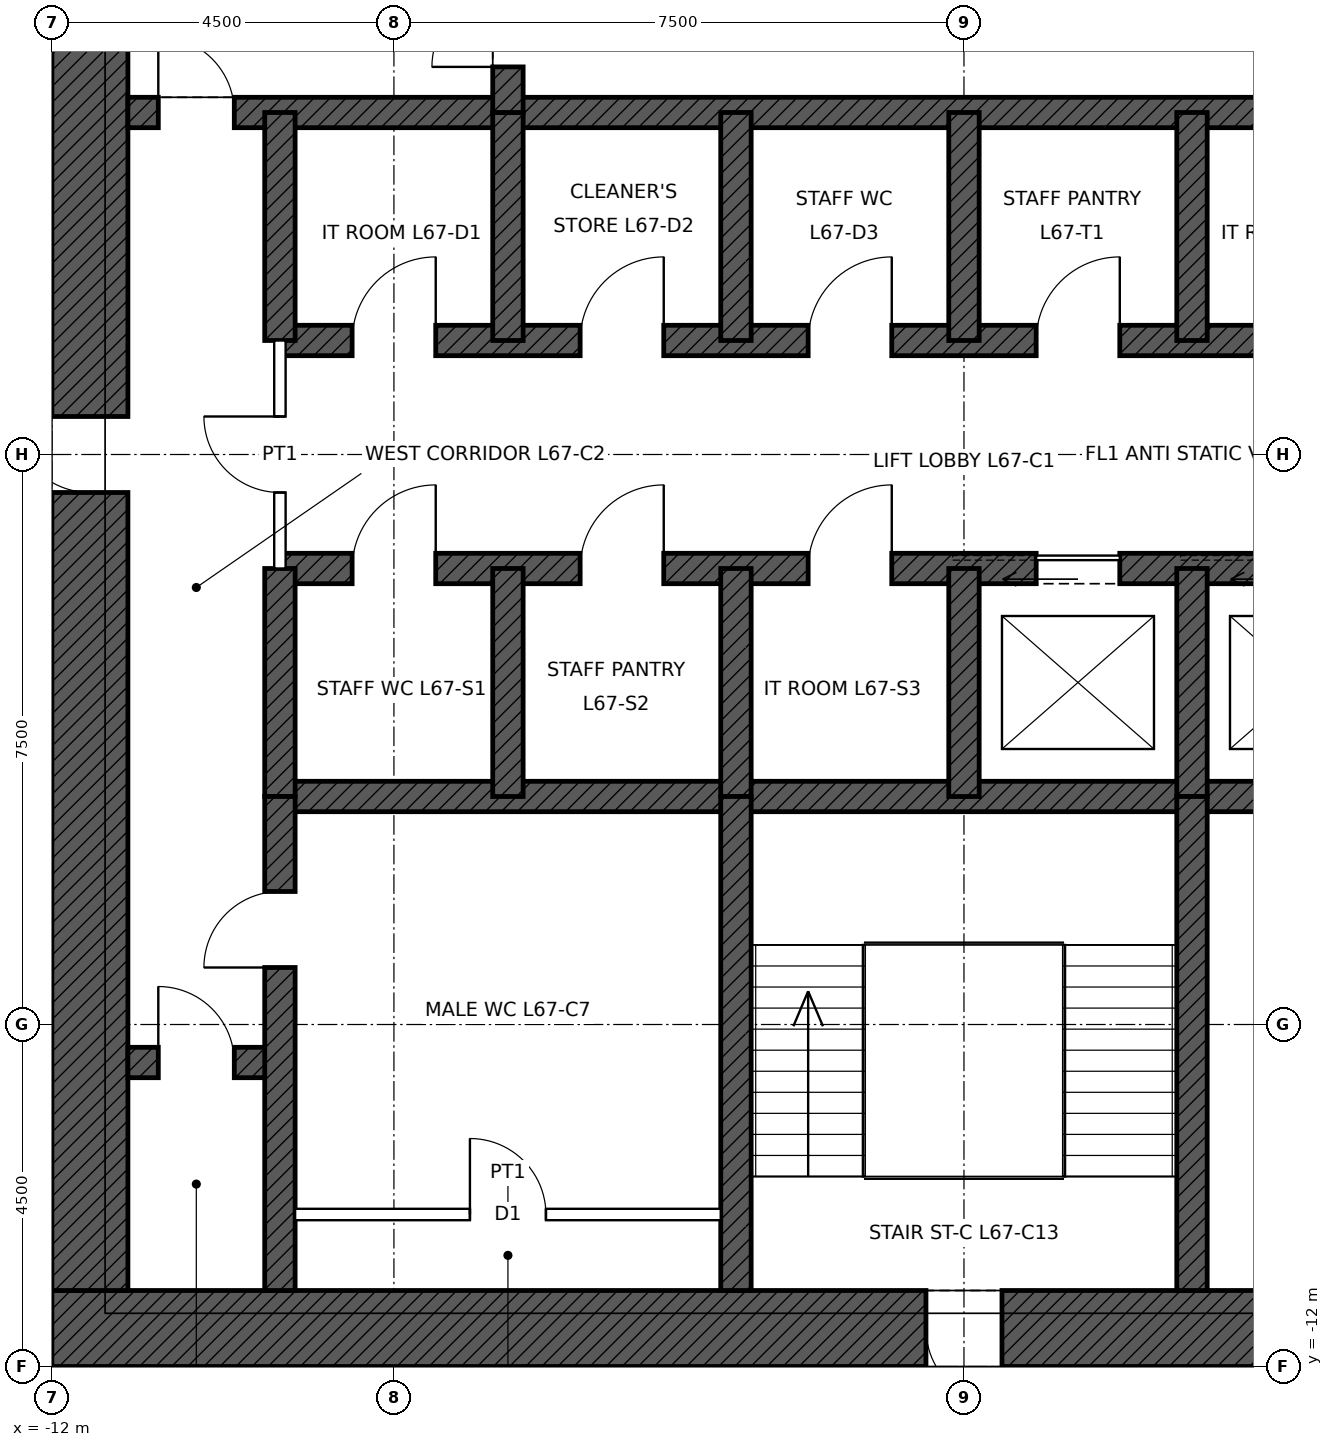
"""IFC4 building model, lengths in metres.
Left out: names, types, materials, properties, quantities, classifications, styles, units other than length and angle.
Written with IfcOpenShell. Run it as: python <this file> out.ifc"""

import sys

from ifc_helpers import new_model, si_unit, direction, frame, frame_2d, origin, place, context, subcontext, project, spatial, rectangle, extrude, element, fill, save


model = new_model("IFC4")
c1 = context("Model", 3, precision=1e-05, world=origin(), true_north=direction((0.0, 1.0)))
c2 = subcontext(c1, "Body", "Model", "MODEL_VIEW")
j1 = project(units=[si_unit("LENGTHUNIT", "METRE"), si_unit("PLANEANGLEUNIT", "RADIAN")], contexts=[c1])
p1 = place(None, origin())
s1 = spatial("IfcSite", under=j1, at=p1, CompositionType="ELEMENT")
p2 = place(p1, origin())
s2 = spatial("IfcBuilding", under=s1, at=p2, CompositionType="ELEMENT")
p3 = place(p2, frame((0.0, 0.0, 303.9)))
s3 = spatial("IfcBuildingStorey", under=s2, at=p3, CompositionType="ELEMENT", Elevation=303.9)
p4 = place(p3, frame((12.0, -11.5, 0.0), z_axis=(0.0, 0.0, 1.0), x_axis=(-1.0, 0.0, 0.0)))
e1 = element("IfcWall", 1, at=p4, inside=s3, PredefinedType="SHEAR", context=c2, shape_type="SweptSolid", body=[
    extrude(rectangle(XDim=24.0, YDim=1.0, at=frame_2d((12.0, 0.0))), origin(), (0.0, 0.0, 1.0), 4.0),
])
p5 = place(p4, frame((11.5, 0.0, 0.0)))
e2 = element("IfcOpeningElement", 2, at=p5, cuts=e1, PredefinedType="OPENING", context=c2, shape_type="SweptSolid", body=[
    extrude(rectangle(XDim=1.0, YDim=2.1, at=frame_2d((0.5, 1.05))), frame((0.0, 0.51, 0.0), z_axis=(0.0, -1.0, 0.0), x_axis=(1.0, 0.0, 0.0)), (0.0, 0.0, 1.0), 1.02),
])
p6 = place(p4, frame((1.0, 0.0, 0.0)))
e3 = element("IfcOpeningElement", 3, at=p6, cuts=e1, PredefinedType="OPENING", context=c2, shape_type="SweptSolid", body=[
    extrude(rectangle(XDim=1.0, YDim=2.4, at=frame_2d((0.5, 1.2))), frame((0.0, 0.51, 0.0), z_axis=(0.0, -1.0, 0.0), x_axis=(1.0, 0.0, 0.0)), (0.0, 0.0, 1.0), 1.02),
])
p7 = place(p3, frame((-11.5, -11.0, 0.0), z_axis=(0.0, 0.0, 1.0), x_axis=(0.0, 1.0, 0.0)))
e4 = element("IfcWall", 4, at=p7, inside=s3, PredefinedType="SHEAR", context=c2, shape_type="SweptSolid", body=[
    extrude(rectangle(XDim=22.0, YDim=1.0, at=frame_2d((11.0, 0.0))), origin(), (0.0, 0.0, 1.0), 4.0),
])
p8 = place(p7, frame((10.5, 0.0, 0.0)))
e5 = element("IfcOpeningElement", 5, at=p8, cuts=e4, PredefinedType="OPENING", context=c2, shape_type="SweptSolid", body=[
    extrude(rectangle(XDim=1.0, YDim=2.4, at=frame_2d((0.5, 1.2))), frame((0.0, 0.51, 0.0), z_axis=(0.0, -1.0, 0.0), x_axis=(1.0, 0.0, 0.0)), (0.0, 0.0, 1.0), 1.02),
])
p9 = place(p3, frame((-11.0, 4.5, 0.0), z_axis=(0.0, 0.0, 1.0), x_axis=(1.0, 0.0, 0.0)))
e6 = element("IfcWall", 6, at=p9, inside=s3, PredefinedType="SHEAR", context=c2, shape_type="SweptSolid", body=[
    extrude(rectangle(XDim=22.0, YDim=0.4, at=frame_2d((11.0, 0.0))), origin(), (0.0, 0.0, 1.0), 4.0),
])
p10 = place(p9, frame((0.4, 0.0, 0.0)))
e7 = element("IfcOpeningElement", 7, at=p10, cuts=e6, PredefinedType="OPENING", context=c2, shape_type="SweptSolid", body=[
    extrude(rectangle(XDim=1.0, YDim=2.1, at=frame_2d((0.5, 1.05))), frame((0.0, 0.21, 0.0), z_axis=(0.0, -1.0, 0.0), x_axis=(1.0, 0.0, 0.0)), (0.0, 0.0, 1.0), 0.42),
])
p11 = place(p9, frame((20.6, 0.0, 0.0)))
e8 = element("IfcOpeningElement", 8, at=p11, cuts=e6, PredefinedType="OPENING", context=c2, shape_type="SweptSolid", body=[
    extrude(rectangle(XDim=1.0, YDim=2.1, at=frame_2d((0.5, 1.05))), frame((0.0, 0.21, 0.0), z_axis=(0.0, -1.0, 0.0), x_axis=(1.0, 0.0, 0.0)), (0.0, 0.0, 1.0), 0.42),
])
p12 = place(p3, frame((-9.0, 1.5, 0.0), z_axis=(0.0, 0.0, 1.0), x_axis=(1.0, 0.0, 0.0)))
e9 = element("IfcWall", 9, at=p12, inside=s3, PredefinedType="SHEAR", context=c2, shape_type="SweptSolid", body=[
    extrude(rectangle(XDim=18.0, YDim=0.4, at=frame_2d((9.0, 0.0))), origin(), (0.0, 0.0, 1.0), 4.0),
])
p13 = place(p12, frame((0.95, 0.0, 0.0)))
e10 = element("IfcOpeningElement", 10, at=p13, cuts=e9, PredefinedType="OPENING", context=c2, shape_type="SweptSolid", body=[
    extrude(rectangle(XDim=1.1, YDim=2.1, at=frame_2d((0.55, 1.05))), frame((0.0, 0.21, 0.0), z_axis=(0.0, -1.0, 0.0), x_axis=(1.0, 0.0, 0.0)), (0.0, 0.0, 1.0), 0.42),
])
p14 = place(p12, frame((3.95, 0.0, 0.0)))
e11 = element("IfcOpeningElement", 11, at=p14, cuts=e9, PredefinedType="OPENING", context=c2, shape_type="SweptSolid", body=[
    extrude(rectangle(XDim=1.1, YDim=2.1, at=frame_2d((0.55, 1.05))), frame((0.0, 0.21, 0.0), z_axis=(0.0, -1.0, 0.0), x_axis=(1.0, 0.0, 0.0)), (0.0, 0.0, 1.0), 0.42),
])
p15 = place(p12, frame((6.95, 0.0, 0.0)))
e12 = element("IfcOpeningElement", 12, at=p15, cuts=e9, PredefinedType="OPENING", context=c2, shape_type="SweptSolid", body=[
    extrude(rectangle(XDim=1.1, YDim=2.1, at=frame_2d((0.55, 1.05))), frame((0.0, 0.21, 0.0), z_axis=(0.0, -1.0, 0.0), x_axis=(1.0, 0.0, 0.0)), (0.0, 0.0, 1.0), 0.42),
])
p16 = place(p12, frame((9.95, 0.0, 0.0)))
e13 = element("IfcOpeningElement", 13, at=p16, cuts=e9, PredefinedType="OPENING", context=c2, shape_type="SweptSolid", body=[
    extrude(rectangle(XDim=1.1, YDim=2.1, at=frame_2d((0.55, 1.05))), frame((0.0, 0.21, 0.0), z_axis=(0.0, -1.0, 0.0), x_axis=(1.0, 0.0, 0.0)), (0.0, 0.0, 1.0), 0.42),
])
p17 = place(p12, frame((12.95, 0.0, 0.0)))
e14 = element("IfcOpeningElement", 14, at=p17, cuts=e9, PredefinedType="OPENING", context=c2, shape_type="SweptSolid", body=[
    extrude(rectangle(XDim=1.1, YDim=2.1, at=frame_2d((0.55, 1.05))), frame((0.0, 0.21, 0.0), z_axis=(0.0, -1.0, 0.0), x_axis=(1.0, 0.0, 0.0)), (0.0, 0.0, 1.0), 0.42),
])
p18 = place(p12, frame((15.95, 0.0, 0.0)))
e15 = element("IfcOpeningElement", 15, at=p18, cuts=e9, PredefinedType="OPENING", context=c2, shape_type="SweptSolid", body=[
    extrude(rectangle(XDim=1.1, YDim=2.1, at=frame_2d((0.55, 1.05))), frame((0.0, 0.21, 0.0), z_axis=(0.0, -1.0, 0.0), x_axis=(1.0, 0.0, 0.0)), (0.0, 0.0, 1.0), 0.42),
])
p19 = place(p3, frame((-9.0, -1.5, 0.0), z_axis=(0.0, 0.0, 1.0), x_axis=(1.0, 0.0, 0.0)))
e16 = element("IfcWall", 16, at=p19, inside=s3, PredefinedType="SHEAR", context=c2, shape_type="SweptSolid", body=[
    extrude(rectangle(XDim=18.0, YDim=0.4, at=frame_2d((9.0, 0.0))), origin(), (0.0, 0.0, 1.0), 4.0),
])
p20 = place(p19, frame((9.95, 0.0, 0.0)))
e17 = element("IfcOpeningElement", 17, at=p20, cuts=e16, PredefinedType="OPENING", context=c2, shape_type="SweptSolid", body=[
    extrude(rectangle(XDim=1.1, YDim=2.1, at=frame_2d((0.55, 1.05))), frame((0.0, 0.21, 0.0), z_axis=(0.0, -1.0, 0.0), x_axis=(1.0, 0.0, 0.0)), (0.0, 0.0, 1.0), 0.42),
])
p21 = place(p19, frame((12.95, 0.0, 0.0)))
e18 = element("IfcOpeningElement", 18, at=p21, cuts=e16, PredefinedType="OPENING", context=c2, shape_type="SweptSolid", body=[
    extrude(rectangle(XDim=1.1, YDim=2.1, at=frame_2d((0.55, 1.05))), frame((0.0, 0.21, 0.0), z_axis=(0.0, -1.0, 0.0), x_axis=(1.0, 0.0, 0.0)), (0.0, 0.0, 1.0), 0.42),
])
p22 = place(p19, frame((15.95, 0.0, 0.0)))
e19 = element("IfcOpeningElement", 19, at=p22, cuts=e16, PredefinedType="OPENING", context=c2, shape_type="SweptSolid", body=[
    extrude(rectangle(XDim=1.1, YDim=2.1, at=frame_2d((0.55, 1.05))), frame((0.0, 0.21, 0.0), z_axis=(0.0, -1.0, 0.0), x_axis=(1.0, 0.0, 0.0)), (0.0, 0.0, 1.0), 0.42),
])
p23 = place(p19, frame((0.95, 0.0, 0.0)))
e20 = element("IfcOpeningElement", 20, at=p23, cuts=e16, PredefinedType="OPENING", context=c2, shape_type="SweptSolid", body=[
    extrude(rectangle(XDim=1.1, YDim=2.1, at=frame_2d((0.55, 1.05))), frame((0.0, 0.21, 0.0), z_axis=(0.0, -1.0, 0.0), x_axis=(1.0, 0.0, 0.0)), (0.0, 0.0, 1.0), 0.42),
])
p24 = place(p19, frame((3.95, 0.0, 0.0)))
e21 = element("IfcOpeningElement", 21, at=p24, cuts=e16, PredefinedType="OPENING", context=c2, shape_type="SweptSolid", body=[
    extrude(rectangle(XDim=1.1, YDim=2.1, at=frame_2d((0.55, 1.05))), frame((0.0, 0.21, 0.0), z_axis=(0.0, -1.0, 0.0), x_axis=(1.0, 0.0, 0.0)), (0.0, 0.0, 1.0), 0.42),
])
p25 = place(p19, frame((6.95, 0.0, 0.0)))
e22 = element("IfcOpeningElement", 22, at=p25, cuts=e16, PredefinedType="OPENING", context=c2, shape_type="SweptSolid", body=[
    extrude(rectangle(XDim=1.1, YDim=2.1, at=frame_2d((0.55, 1.05))), frame((0.0, 0.21, 0.0), z_axis=(0.0, -1.0, 0.0), x_axis=(1.0, 0.0, 0.0)), (0.0, 0.0, 1.0), 0.42),
])
p26 = place(p3, frame((-9.0, -4.5, 0.0), z_axis=(0.0, 0.0, 1.0), x_axis=(1.0, 0.0, 0.0)))
e23 = element("IfcWall", 23, at=p26, inside=s3, PredefinedType="SHEAR", context=c2, shape_type="SweptSolid", body=[
    extrude(rectangle(XDim=18.0, YDim=0.4, at=frame_2d((9.0, 0.0))), origin(), (0.0, 0.0, 1.0), 4.0),
])
p27 = place(p3, frame((-11.0, -8.0, 0.0), z_axis=(0.0, 0.0, 1.0), x_axis=(1.0, 0.0, 0.0)))
e24 = element("IfcWall", 24, at=p27, inside=s3, PredefinedType="SHEAR", context=c2, shape_type="SweptSolid", body=[
    extrude(rectangle(XDim=2.0, YDim=0.4, at=frame_2d((1.0, 0.0))), origin(), (0.0, 0.0, 1.0), 4.0),
])
p28 = place(p27, frame((0.4, 0.0, 0.0)))
e25 = element("IfcOpeningElement", 25, at=p28, cuts=e24, PredefinedType="OPENING", context=c2, shape_type="SweptSolid", body=[
    extrude(rectangle(XDim=1.0, YDim=2.1, at=frame_2d((0.5, 1.05))), frame((0.0, 0.21, 0.0), z_axis=(0.0, -1.0, 0.0), x_axis=(1.0, 0.0, 0.0)), (0.0, 0.0, 1.0), 0.42),
])
for number, where, z_axis, x_axis in (
    (26, (-9.0, 1.5, 0.0), (0.0, 0.0, 1.0), (0.0, 1.0, 0.0)),
    (27, (-9.0, -4.5, 0.0), (0.0, 0.0, 1.0), (0.0, 1.0, 0.0)),
    (28, (-6.0, 1.5, 0.0), (0.0, 0.0, 1.0), (0.0, 1.0, 0.0)),
    (29, (-3.0, 1.5, 0.0), (0.0, 0.0, 1.0), (0.0, 1.0, 0.0)),
    (30, (0.0, 1.5, 0.0), (0.0, 0.0, 1.0), (0.0, 1.0, 0.0)),
    (31, (3.0, 1.5, 0.0), (0.0, 0.0, 1.0), (0.0, 1.0, 0.0)),
    (32, (-6.0, -4.5, 0.0), (0.0, 0.0, 1.0), (0.0, 1.0, 0.0)),
    (33, (-3.0, -4.5, 0.0), (0.0, 0.0, 1.0), (0.0, 1.0, 0.0)),
    (34, (0.0, -4.5, 0.0), (0.0, 0.0, 1.0), (0.0, 1.0, 0.0)),
    (35, (3.0, -4.5, 0.0), (0.0, 0.0, 1.0), (0.0, 1.0, 0.0)),
):
    element("IfcWall", number, at=place(p3, frame(where, z_axis=z_axis, x_axis=x_axis)), inside=s3, PredefinedType="SHEAR", context=c2, shape_type="SweptSolid", body=[
        extrude(rectangle(XDim=3.0, YDim=0.4, at=frame_2d((1.5, 0.0))), origin(), (0.0, 0.0, 1.0), 4.0),
    ])
p29 = place(p3, frame((-6.0, 4.5, 0.0), z_axis=(0.0, 0.0, 1.0), x_axis=(0.0, 1.0, 0.0)))
e36 = element("IfcWall", 36, at=p29, inside=s3, PredefinedType="SHEAR", context=c2, shape_type="SweptSolid", body=[
    extrude(rectangle(XDim=6.5, YDim=0.4, at=frame_2d((3.25, 0.0))), origin(), (0.0, 0.0, 1.0), 4.0),
])
p30 = place(p29, frame((0.6, 0.0, 0.0)))
e37 = element("IfcOpeningElement", 37, at=p30, cuts=e36, PredefinedType="OPENING", context=c2, shape_type="SweptSolid", body=[
    extrude(rectangle(XDim=1.0, YDim=2.1, at=frame_2d((0.5, 1.05))), frame((0.0, 0.21, 0.0), z_axis=(0.0, -1.0, 0.0), x_axis=(1.0, 0.0, 0.0)), (0.0, 0.0, 1.0), 0.42),
])
p31 = place(p3, frame((-9.0, -11.0, 0.0), z_axis=(0.0, 0.0, 1.0), x_axis=(0.0, 1.0, 0.0)))
e38 = element("IfcWall", 38, at=p31, inside=s3, PredefinedType="SHEAR", context=c2, shape_type="SweptSolid", body=[
    extrude(rectangle(XDim=6.5, YDim=0.4, at=frame_2d((3.25, 0.0))), origin(), (0.0, 0.0, 1.0), 4.0),
])
p32 = place(p31, frame((4.25, 0.0, 0.0)))
e39 = element("IfcOpeningElement", 39, at=p32, cuts=e38, PredefinedType="OPENING", context=c2, shape_type="SweptSolid", body=[
    extrude(rectangle(XDim=1.0, YDim=2.1, at=frame_2d((0.5, 1.05))), frame((0.0, 0.21, 0.0), z_axis=(0.0, -1.0, 0.0), x_axis=(1.0, 0.0, 0.0)), (0.0, 0.0, 1.0), 0.42),
])
for number, where, z_axis, x_axis in (
    (40, (-3.0, -11.0, 0.0), (0.0, 0.0, 1.0), (0.0, 1.0, 0.0)),
    (41, (3.0, -11.0, 0.0), (0.0, 0.0, 1.0), (0.0, 1.0, 0.0)),
):
    element("IfcWall", number, at=place(p3, frame(where, z_axis=z_axis, x_axis=x_axis)), inside=s3, PredefinedType="SHEAR", context=c2, shape_type="SweptSolid", body=[
        extrude(rectangle(XDim=6.5, YDim=0.4, at=frame_2d((3.25, 0.0))), origin(), (0.0, 0.0, 1.0), 4.0),
    ])
p33 = place(p3, frame((-8.8, -10.0, 0.0), z_axis=(0.0, 0.0, 1.0), x_axis=(1.0, 0.0, 0.0)))
e42 = element("IfcWall", 42, at=p33, inside=s3, PredefinedType="PARTITIONING", context=c2, shape_type="SweptSolid", body=[
    extrude(rectangle(XDim=5.6, YDim=0.15, at=frame_2d((2.8, 0.0))), origin(), (0.0, 0.0, 1.0), 3.75),
])
p34 = place(p33, frame((2.3, 0.0, 0.0)))
e43 = element("IfcOpeningElement", 43, at=p34, cuts=e42, PredefinedType="OPENING", context=c2, shape_type="SweptSolid", body=[
    extrude(rectangle(XDim=1.0, YDim=2.1, at=frame_2d((0.5, 1.05))), frame((0.0, 0.085, 0.0), z_axis=(0.0, -1.0, 0.0), x_axis=(1.0, 0.0, 0.0)), (0.0, 0.0, 1.0), 0.17),
])
p35 = place(p3, frame((-9.0, -1.5, 0.0), z_axis=(0.0, 0.0, 1.0), x_axis=(0.0, 1.0, 0.0)))
e44 = element("IfcWall", 44, at=p35, inside=s3, PredefinedType="PARTITIONING", context=c2, shape_type="SweptSolid", body=[
    extrude(rectangle(XDim=3.0, YDim=0.15, at=frame_2d((1.5, 0.0))), origin(), (0.0, 0.0, 1.0), 3.75),
])
p36 = place(p35, frame((1.0, 0.0, 0.0)))
e45 = element("IfcOpeningElement", 45, at=p36, cuts=e44, PredefinedType="OPENING", context=c2, shape_type="SweptSolid", body=[
    extrude(rectangle(XDim=1.0, YDim=2.4, at=frame_2d((0.5, 1.2))), frame((0.0, 0.085, 0.0), z_axis=(0.0, -1.0, 0.0), x_axis=(1.0, 0.0, 0.0)), (0.0, 0.0, 1.0), 0.17),
])
p37 = place(p10, origin())
e46 = element("IfcDoor", 46, at=p37, inside=s3, OperationType="SINGLE_SWING_LEFT", PredefinedType="DOOR", context=c2, shape_type="SweptSolid", body=[
    extrude(rectangle(XDim=1.0, YDim=2.1, at=frame_2d((0.5, 1.05))), frame((0.0, 0.025, 0.0), z_axis=(0.0, -1.0, 0.0), x_axis=(1.0, 0.0, 0.0)), (0.0, 0.0, 1.0), 0.05),
])
fill(e7, e46)
p38 = place(p30, origin())
e47 = element("IfcDoor", 47, at=p38, inside=s3, OperationType="SINGLE_SWING_LEFT", PredefinedType="DOOR", context=c2, shape_type="SweptSolid", body=[
    extrude(rectangle(XDim=1.0, YDim=2.1, at=frame_2d((0.5, 1.05))), frame((0.0, 0.025, 0.0), z_axis=(0.0, -1.0, 0.0), x_axis=(1.0, 0.0, 0.0)), (0.0, 0.0, 1.0), 0.05),
])
fill(e37, e47)
p39 = place(p5, origin())
e48 = element("IfcDoor", 48, at=p39, inside=s3, OperationType="SINGLE_SWING_LEFT", PredefinedType="DOOR", context=c2, shape_type="SweptSolid", body=[
    extrude(rectangle(XDim=1.0, YDim=2.1, at=frame_2d((0.5, 1.05))), frame((0.0, 0.485, 0.0), z_axis=(0.0, -1.0, 0.0), x_axis=(1.0, 0.0, 0.0)), (0.0, 0.0, 1.0), 0.05),
])
fill(e2, e48)
p40 = place(p8, origin())
e49 = element("IfcDoor", 49, at=p40, inside=s3, OperationType="SINGLE_SWING_RIGHT", PredefinedType="DOOR", context=c2, shape_type="SweptSolid", body=[
    extrude(rectangle(XDim=1.0, YDim=2.4, at=frame_2d((0.5, 1.2))), frame((0.0, 0.485, 0.0), z_axis=(0.0, -1.0, 0.0), x_axis=(1.0, 0.0, 0.0)), (0.0, 0.0, 1.0), 0.05),
])
fill(e5, e49)
p41 = place(p32, origin())
e50 = element("IfcDoor", 50, at=p41, inside=s3, OperationType="SINGLE_SWING_LEFT", PredefinedType="DOOR", context=c2, shape_type="SweptSolid", body=[
    extrude(rectangle(XDim=1.0, YDim=2.1, at=frame_2d((0.5, 1.05))), frame((0.0, 0.025, 0.0), z_axis=(0.0, -1.0, 0.0), x_axis=(1.0, 0.0, 0.0)), (0.0, 0.0, 1.0), 0.05),
])
fill(e39, e50)
p42 = place(p28, origin())
e51 = element("IfcDoor", 51, at=p42, inside=s3, OperationType="SINGLE_SWING_LEFT", PredefinedType="DOOR", context=c2, shape_type="SweptSolid", body=[
    extrude(rectangle(XDim=1.0, YDim=2.1, at=frame_2d((0.5, 1.05))), frame((0.0, 0.025, 0.0), z_axis=(0.0, -1.0, 0.0), x_axis=(1.0, 0.0, 0.0)), (0.0, 0.0, 1.0), 0.05),
])
fill(e25, e51)
p43 = place(p20, origin())
e52 = element("IfcDoor", 52, at=p43, inside=s3, OperationType="SLIDING_TO_LEFT", PredefinedType="DOOR", context=c2, shape_type="SweptSolid", body=[
    extrude(rectangle(XDim=1.1, YDim=2.1, at=frame_2d((0.55, 1.05))), frame((0.0, 0.025, 0.0), z_axis=(0.0, -1.0, 0.0), x_axis=(1.0, 0.0, 0.0)), (0.0, 0.0, 1.0), 0.05),
])
fill(e17, e52)
p44 = place(p34, origin())
e53 = element("IfcDoor", 53, at=p44, inside=s3, OperationType="SINGLE_SWING_LEFT", PredefinedType="DOOR", context=c2, shape_type="SweptSolid", body=[
    extrude(rectangle(XDim=1.0, YDim=2.1, at=frame_2d((0.5, 1.05))), frame((0.0, 0.025, 0.0), z_axis=(0.0, -1.0, 0.0), x_axis=(1.0, 0.0, 0.0)), (0.0, 0.0, 1.0), 0.05),
])
fill(e43, e53)
p45 = place(p36, origin())
e54 = element("IfcDoor", 54, at=p45, inside=s3, OperationType="SINGLE_SWING_RIGHT", PredefinedType="DOOR", context=c2, shape_type="SweptSolid", body=[
    extrude(rectangle(XDim=1.0, YDim=2.4, at=frame_2d((0.5, 1.2))), frame((0.0, 0.025, 0.0), z_axis=(0.0, -1.0, 0.0), x_axis=(1.0, 0.0, 0.0)), (0.0, 0.0, 1.0), 0.05),
])
fill(e45, e54)
p46 = place(p13, origin())
e55 = element("IfcDoor", 55, at=p46, inside=s3, OperationType="SINGLE_SWING_RIGHT", PredefinedType="DOOR", context=c2, shape_type="SweptSolid", body=[
    extrude(rectangle(XDim=1.1, YDim=2.1, at=frame_2d((0.55, 1.05))), frame((0.0, 0.025, 0.0), z_axis=(0.0, -1.0, 0.0), x_axis=(1.0, 0.0, 0.0)), (0.0, 0.0, 1.0), 0.05),
])
fill(e10, e55)
p47 = place(p14, origin())
e56 = element("IfcDoor", 56, at=p47, inside=s3, OperationType="SINGLE_SWING_RIGHT", PredefinedType="DOOR", context=c2, shape_type="SweptSolid", body=[
    extrude(rectangle(XDim=1.1, YDim=2.1, at=frame_2d((0.55, 1.05))), frame((0.0, 0.025, 0.0), z_axis=(0.0, -1.0, 0.0), x_axis=(1.0, 0.0, 0.0)), (0.0, 0.0, 1.0), 0.05),
])
fill(e11, e56)
p48 = place(p15, origin())
e57 = element("IfcDoor", 57, at=p48, inside=s3, OperationType="SINGLE_SWING_RIGHT", PredefinedType="DOOR", context=c2, shape_type="SweptSolid", body=[
    extrude(rectangle(XDim=1.1, YDim=2.1, at=frame_2d((0.55, 1.05))), frame((0.0, 0.025, 0.0), z_axis=(0.0, -1.0, 0.0), x_axis=(1.0, 0.0, 0.0)), (0.0, 0.0, 1.0), 0.05),
])
fill(e12, e57)
p49 = place(p16, origin())
e58 = element("IfcDoor", 58, at=p49, inside=s3, OperationType="SINGLE_SWING_RIGHT", PredefinedType="DOOR", context=c2, shape_type="SweptSolid", body=[
    extrude(rectangle(XDim=1.1, YDim=2.1, at=frame_2d((0.55, 1.05))), frame((0.0, 0.025, 0.0), z_axis=(0.0, -1.0, 0.0), x_axis=(1.0, 0.0, 0.0)), (0.0, 0.0, 1.0), 0.05),
])
fill(e13, e58)
p50 = place(p23, origin())
e59 = element("IfcDoor", 59, at=p50, inside=s3, OperationType="SINGLE_SWING_RIGHT", PredefinedType="DOOR", context=c2, shape_type="SweptSolid", body=[
    extrude(rectangle(XDim=1.1, YDim=2.1, at=frame_2d((0.55, 1.05))), frame((0.0, 0.025, 0.0), z_axis=(0.0, -1.0, 0.0), x_axis=(1.0, 0.0, 0.0)), (0.0, 0.0, 1.0), 0.05),
])
fill(e20, e59)
p51 = place(p24, origin())
e60 = element("IfcDoor", 60, at=p51, inside=s3, OperationType="SINGLE_SWING_RIGHT", PredefinedType="DOOR", context=c2, shape_type="SweptSolid", body=[
    extrude(rectangle(XDim=1.1, YDim=2.1, at=frame_2d((0.55, 1.05))), frame((0.0, 0.025, 0.0), z_axis=(0.0, -1.0, 0.0), x_axis=(1.0, 0.0, 0.0)), (0.0, 0.0, 1.0), 0.05),
])
fill(e21, e60)
p52 = place(p25, origin())
e61 = element("IfcDoor", 61, at=p52, inside=s3, OperationType="SINGLE_SWING_RIGHT", PredefinedType="DOOR", context=c2, shape_type="SweptSolid", body=[
    extrude(rectangle(XDim=1.1, YDim=2.1, at=frame_2d((0.55, 1.05))), frame((0.0, 0.025, 0.0), z_axis=(0.0, -1.0, 0.0), x_axis=(1.0, 0.0, 0.0)), (0.0, 0.0, 1.0), 0.05),
])
fill(e22, e61)
save(model, sys.argv[1])
